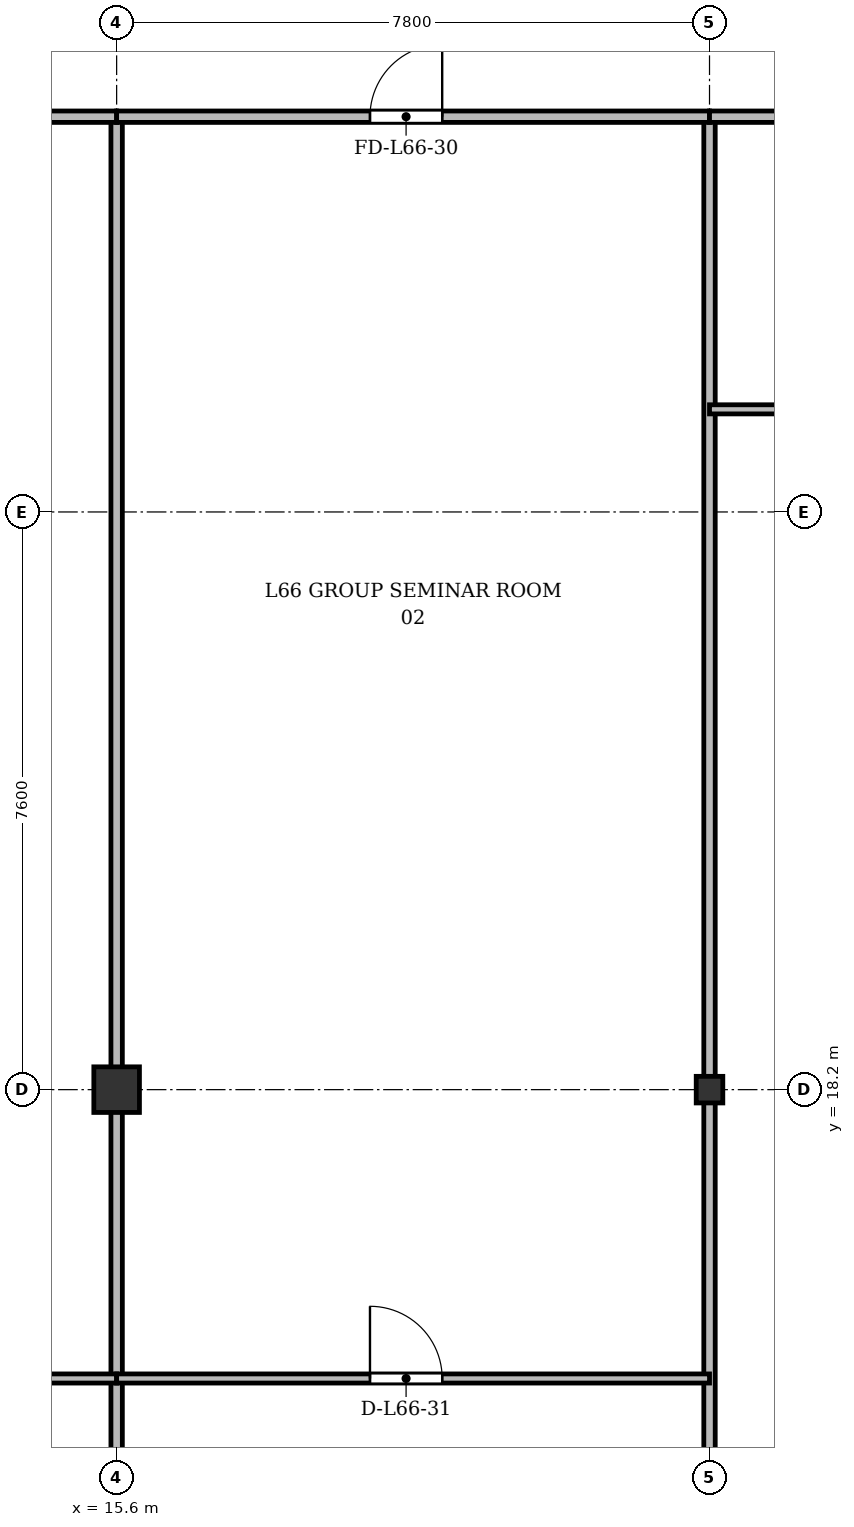
"""IFC4 building model, lengths in metres.
Left out: names, types, materials, properties, quantities, classifications, styles, units other than length and angle.
Written with IfcOpenShell. Run it as: python <this file> out.ifc"""

import sys

from ifc_helpers import new_model, si_unit, direction, frame, frame_2d, origin, origin_2d, place, context, subcontext, project, spatial, rectangle, i_section, extrude, source, transform, mapped, element, fill, save


model = new_model("IFC4")
c1 = context("Model", 3, precision=1e-05, world=origin(), true_north=direction((0.0, 1.0)))
c2 = subcontext(c1, "Body", "Model", "MODEL_VIEW")
j1 = project(units=[si_unit("LENGTHUNIT", "METRE"), si_unit("PLANEANGLEUNIT", "RADIAN")], contexts=[c1])
p1 = place(None, origin())
s1 = spatial("IfcSite", under=j1, at=p1, CompositionType="ELEMENT")
p2 = place(p1, origin())
s2 = spatial("IfcBuilding", under=s1, at=p2, CompositionType="ELEMENT")
p3 = place(p2, frame((0.0, 0.0, 255.9)))
s3 = spatial("IfcBuildingStorey", under=s2, at=p3, CompositionType="ELEMENT", Elevation=255.9)
m1 = source(origin(), c2, "Body", "SweptSolid", [
    extrude(rectangle(XDim=0.6, YDim=0.6, at=origin_2d()), origin(), (0.0, 0.0, 1.0), 3.6),
])
p4 = place(p3, frame((15.6, 18.2, 0.0), z_axis=(0.0, 0.0, 1.0), x_axis=(1.0, 0.0, 0.0)))
e1 = element("IfcColumn", 1, at=p4, inside=s3, PredefinedType="COLUMN", context=c2, shape_type="MappedRepresentation", body=[
    mapped(m1, transform((0.0, 0.0, 0.0), x_axis=(1.0, 0.0, 0.0), y_axis=(0.0, 1.0, 0.0), z_axis=(0.0, 0.0, 1.0), scale=1.0)),
])
m2 = source(origin(), c2, "Body", "SweptSolid", [
    extrude(i_section(OverallWidth=0.35, OverallDepth=0.35, WebThickness=0.018, FlangeThickness=0.028, at=origin_2d()), origin(), (0.0, 0.0, 1.0), 3.6),
])
p5 = place(p3, frame((23.4, 18.2, 0.0), z_axis=(0.0, 0.0, 1.0), x_axis=(1.0, 0.0, 0.0)))
e2 = element("IfcColumn", 2, at=p5, inside=s3, PredefinedType="COLUMN", context=c2, shape_type="MappedRepresentation", body=[
    mapped(m2, transform((0.0, 0.0, 0.0), x_axis=(1.0, 0.0, 0.0), y_axis=(0.0, 1.0, 0.0), z_axis=(0.0, 0.0, 1.0), scale=1.0)),
])
for number, where, z_axis, x_axis in (
    (3, (15.6, 3.725, 0.0), (0.0, 0.0, 1.0), (0.0, 1.0, 0.0)),
    (4, (23.4, 3.725, 0.0), (0.0, 0.0, 1.0), (0.0, 1.0, 0.0)),
):
    element("IfcWall", number, at=place(p3, frame(where, z_axis=z_axis, x_axis=x_axis)), inside=s3, PredefinedType="PARTITIONING", context=c2, shape_type="SweptSolid", body=[
        extrude(rectangle(XDim=27.275, YDim=0.15, at=frame_2d((13.637, 0.0))), origin(), (0.0, 0.0, 1.0), 2.87),
    ])
p6 = place(p3, frame((8.425, 31.0, 0.0), z_axis=(0.0, 0.0, 1.0), x_axis=(1.0, 0.0, 0.0)))
e5 = element("IfcWall", 5, at=p6, inside=s3, PredefinedType="PARTITIONING", context=c2, shape_type="SweptSolid", body=[
    extrude(rectangle(XDim=7.175, YDim=0.15, at=frame_2d((3.587, 0.0))), origin(), (0.0, 0.0, 1.0), 2.87),
])
p7 = place(p6, frame((3.112, 0.0, 0.0)))
e6 = element("IfcOpeningElement", 6, at=p7, cuts=e5, PredefinedType="OPENING", context=c2, shape_type="SweptSolid", body=[
    extrude(rectangle(XDim=0.95, YDim=2.15, at=frame_2d((0.475, 1.075))), frame((0.0, 0.085, 0.0), z_axis=(0.0, -1.0, 0.0), x_axis=(1.0, 0.0, 0.0)), (0.0, 0.0, 1.0), 0.17),
])
p8 = place(p3, frame((8.425, 14.4, 0.0), z_axis=(0.0, 0.0, 1.0), x_axis=(1.0, 0.0, 0.0)))
e7 = element("IfcWall", 7, at=p8, inside=s3, PredefinedType="PARTITIONING", context=c2, shape_type="SweptSolid", body=[
    extrude(rectangle(XDim=7.175, YDim=0.12, at=frame_2d((3.587, 0.0))), origin(), (0.0, 0.0, 1.0), 2.87),
])
p9 = place(p8, frame((3.112, 0.0, 0.0)))
e8 = element("IfcOpeningElement", 8, at=p9, cuts=e7, PredefinedType="OPENING", context=c2, shape_type="SweptSolid", body=[
    extrude(rectangle(XDim=0.95, YDim=2.15, at=frame_2d((0.475, 1.075))), frame((0.0, 0.07, 0.0), z_axis=(0.0, -1.0, 0.0), x_axis=(1.0, 0.0, 0.0)), (0.0, 0.0, 1.0), 0.14),
])
p10 = place(p3, frame((15.6, 31.0, 0.0), z_axis=(0.0, 0.0, 1.0), x_axis=(1.0, 0.0, 0.0)))
e9 = element("IfcWall", 9, at=p10, inside=s3, PredefinedType="PARTITIONING", context=c2, shape_type="SweptSolid", body=[
    extrude(rectangle(XDim=7.8, YDim=0.15, at=frame_2d((3.9, 0.0))), origin(), (0.0, 0.0, 1.0), 2.87),
])
p11 = place(p10, frame((3.333, 0.0, 0.0)))
e10 = element("IfcOpeningElement", 10, at=p11, cuts=e9, PredefinedType="OPENING", context=c2, shape_type="SweptSolid", body=[
    extrude(rectangle(XDim=0.95, YDim=2.15, at=frame_2d((0.475, 1.075))), frame((0.0, 0.085, 0.0), z_axis=(0.0, -1.0, 0.0), x_axis=(1.0, 0.0, 0.0)), (0.0, 0.0, 1.0), 0.17),
])
p12 = place(p3, frame((15.6, 14.4, 0.0), z_axis=(0.0, 0.0, 1.0), x_axis=(1.0, 0.0, 0.0)))
e11 = element("IfcWall", 11, at=p12, inside=s3, PredefinedType="PARTITIONING", context=c2, shape_type="SweptSolid", body=[
    extrude(rectangle(XDim=7.8, YDim=0.12, at=frame_2d((3.9, 0.0))), origin(), (0.0, 0.0, 1.0), 2.87),
])
p13 = place(p12, frame((3.333, 0.0, 0.0)))
e12 = element("IfcOpeningElement", 12, at=p13, cuts=e11, PredefinedType="OPENING", context=c2, shape_type="SweptSolid", body=[
    extrude(rectangle(XDim=0.95, YDim=2.15, at=frame_2d((0.475, 1.075))), frame((0.0, 0.07, 0.0), z_axis=(0.0, -1.0, 0.0), x_axis=(1.0, 0.0, 0.0)), (0.0, 0.0, 1.0), 0.14),
])
p14 = place(p3, frame((23.4, 31.0, 0.0), z_axis=(0.0, 0.0, 1.0), x_axis=(1.0, 0.0, 0.0)))
e13 = element("IfcWall", 13, at=p14, inside=s3, PredefinedType="PARTITIONING", context=c2, shape_type="SweptSolid", body=[
    extrude(rectangle(XDim=7.2, YDim=0.15, at=frame_2d((3.6, 0.0))), origin(), (0.0, 0.0, 1.0), 2.87),
])
p15 = place(p14, frame((3.125, 0.0, 0.0)))
e14 = element("IfcOpeningElement", 14, at=p15, cuts=e13, PredefinedType="OPENING", context=c2, shape_type="SweptSolid", body=[
    extrude(rectangle(XDim=0.95, YDim=2.15, at=frame_2d((0.475, 1.075))), frame((0.0, 0.085, 0.0), z_axis=(0.0, -1.0, 0.0), x_axis=(1.0, 0.0, 0.0)), (0.0, 0.0, 1.0), 0.17),
])
p16 = place(p3, frame((23.4, 27.15, 0.0), z_axis=(0.0, 0.0, 1.0), x_axis=(1.0, 0.0, 0.0)))
e15 = element("IfcWall", 15, at=p16, inside=s3, PredefinedType="PARTITIONING", context=c2, shape_type="SweptSolid", body=[
    extrude(rectangle(XDim=7.2, YDim=0.12, at=frame_2d((3.6, 0.0))), origin(), (0.0, 0.0, 1.0), 2.87),
])
p17 = place(p16, frame((3.125, 0.0, 0.0)))
e16 = element("IfcOpeningElement", 16, at=p17, cuts=e15, PredefinedType="OPENING", context=c2, shape_type="SweptSolid", body=[
    extrude(rectangle(XDim=0.95, YDim=2.15, at=frame_2d((0.475, 1.075))), frame((0.0, 0.07, 0.0), z_axis=(0.0, -1.0, 0.0), x_axis=(1.0, 0.0, 0.0)), (0.0, 0.0, 1.0), 0.14),
])
m3 = source(origin(), c2, "Body", "SweptSolid", [
    extrude(rectangle(XDim=0.95, YDim=2.15, at=frame_2d((0.475, 1.075))), frame((0.0, 0.025, 0.0), z_axis=(0.0, -1.0, 0.0), x_axis=(1.0, 0.0, 0.0)), (0.0, 0.0, 1.0), 0.05),
])
p18 = place(p11, origin())
e17 = element("IfcDoor", 17, at=p18, inside=s3, OperationType="SINGLE_SWING_RIGHT", PredefinedType="DOOR", context=c2, shape_type="MappedRepresentation", body=[
    mapped(m3, transform((0.0, 0.0, 0.0), x_axis=(1.0, 0.0, 0.0), y_axis=(0.0, 1.0, 0.0), z_axis=(0.0, 0.0, 1.0), scale=1.0)),
])
fill(e10, e17)
p19 = place(p13, origin())
e18 = element("IfcDoor", 18, at=p19, inside=s3, OperationType="SINGLE_SWING_LEFT", PredefinedType="DOOR", context=c2, shape_type="MappedRepresentation", body=[
    mapped(m3, transform((0.0, 0.0, 0.0), x_axis=(1.0, 0.0, 0.0), y_axis=(0.0, 1.0, 0.0), z_axis=(0.0, 0.0, 1.0), scale=1.0)),
])
fill(e12, e18)
save(model, sys.argv[1])
